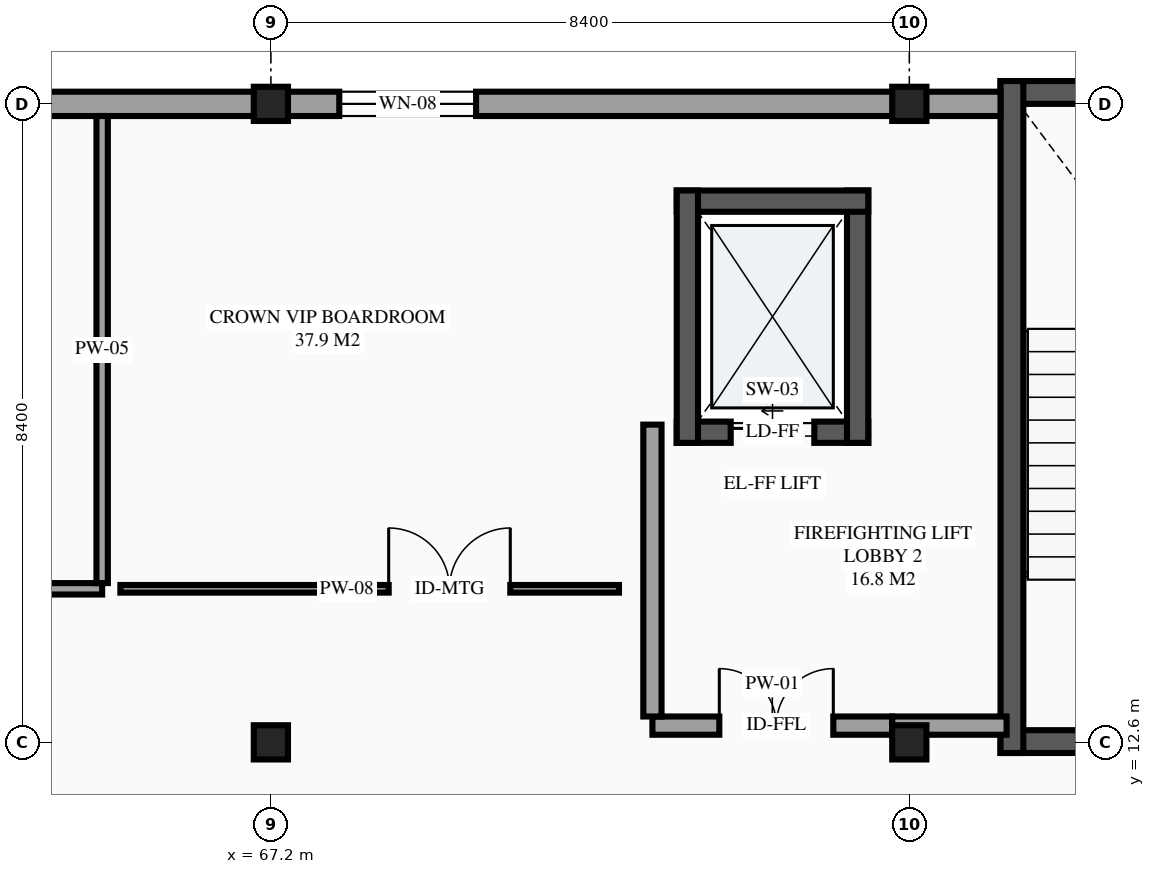
"""IFC4 building model, lengths in metres.
Left out: names, types, materials, properties, quantities, classifications, styles, units other than length and angle.
Written with IfcOpenShell. Run it as: python <this file> out.ifc"""

import sys

from ifc_helpers import new_model, si_unit, direction, frame, frame_2d, origin, origin_2d, place, context, subcontext, project, spatial, rectangle, extrude, element, fill, save


model = new_model("IFC4")
c1 = context("Model", 3, precision=1e-05, world=origin(), true_north=direction((0.0, 1.0)))
c2 = subcontext(c1, "Body", "Model", "MODEL_VIEW")
j1 = project(units=[si_unit("LENGTHUNIT", "METRE"), si_unit("PLANEANGLEUNIT", "RADIAN")], contexts=[c1])
p1 = place(None, origin())
s1 = spatial("IfcSite", under=j1, at=p1, CompositionType="ELEMENT")
p2 = place(p1, origin())
s2 = spatial("IfcBuilding", under=s1, at=p2, CompositionType="ELEMENT")
p3 = place(p2, frame((0.0, 0.0, 43.5)))
s3 = spatial("IfcBuildingStorey", under=s2, at=p3, CompositionType="ELEMENT", Elevation=43.5)
for number, where, z_axis, x_axis in (
    (1, (67.2, 12.6, 0.0), (0.0, 0.0, 1.0), (1.0, 0.0, 0.0)),
    (2, (67.2, 21.0, 0.0), (0.0, 0.0, 1.0), (1.0, 0.0, 0.0)),
    (3, (75.6, 12.6, 0.0), (0.0, 0.0, 1.0), (1.0, 0.0, 0.0)),
    (4, (75.6, 21.0, 0.0), (0.0, 0.0, 1.0), (1.0, 0.0, 0.0)),
):
    element("IfcColumn", number, at=place(p3, frame(where, z_axis=z_axis, x_axis=x_axis)), inside=s3, PredefinedType="COLUMN", context=c2, shape_type="SweptSolid", body=[
        extrude(rectangle(XDim=0.45, YDim=0.45, at=origin_2d()), origin(), (0.0, 0.0, 1.0), 3.6),
    ])
p4 = place(p3, frame((75.6, 21.0, 0.0), z_axis=(0.0, 0.0, 1.0), x_axis=(-1.0, 0.0, 0.0)))
e5 = element("IfcWall", 5, at=p4, inside=s3, PredefinedType="STANDARD", context=c2, shape_type="SweptSolid", body=[
    extrude(rectangle(XDim=16.8, YDim=0.32, at=frame_2d((8.4, 0.0))), origin(), (0.0, 0.0, 1.0), 2.66),
])
p5 = place(p4, frame((5.7, 0.0, 0.75)))
e6 = element("IfcOpeningElement", 6, at=p5, cuts=e5, PredefinedType="OPENING", context=c2, shape_type="SweptSolid", body=[
    extrude(rectangle(XDim=1.8, YDim=1.5, at=frame_2d((0.9, 0.75))), frame((0.0, 0.17, 0.0), z_axis=(0.0, -1.0, 0.0), x_axis=(1.0, 0.0, 0.0)), (0.0, 0.0, 1.0), 0.34),
])
p6 = place(p3, frame((72.54, 16.68, 0.0), z_axis=(0.0, 0.0, 1.0), x_axis=(1.0, 0.0, 0.0)))
e7 = element("IfcWall", 7, at=p6, inside=s3, PredefinedType="SHEAR", context=c2, shape_type="SweptSolid", body=[
    extrude(rectangle(XDim=2.52, YDim=0.28, at=frame_2d((1.26, 0.0))), origin(), (0.0, 0.0, 1.0), 3.6),
])
p7 = place(p6, frame((0.71, 0.0, 0.0)))
e8 = element("IfcOpeningElement", 8, at=p7, cuts=e7, PredefinedType="OPENING", context=c2, shape_type="SweptSolid", body=[
    extrude(rectangle(XDim=1.1, YDim=2.2, at=frame_2d((0.55, 1.1))), frame((0.0, 0.15, 0.0), z_axis=(0.0, -1.0, 0.0), x_axis=(1.0, 0.0, 0.0)), (0.0, 0.0, 1.0), 0.3),
])
p8 = place(p3, frame((74.92, 16.54, 0.0), z_axis=(0.0, 0.0, 1.0), x_axis=(0.0, 1.0, 0.0)))
e9 = element("IfcWall", 9, at=p8, inside=s3, PredefinedType="SHEAR", context=c2, shape_type="SweptSolid", body=[
    extrude(rectangle(XDim=3.32, YDim=0.28, at=frame_2d((1.66, 0.0))), origin(), (0.0, 0.0, 1.0), 3.6),
])
p9 = place(p3, frame((75.06, 19.72, 0.0), z_axis=(0.0, 0.0, 1.0), x_axis=(-1.0, 0.0, 0.0)))
e10 = element("IfcWall", 10, at=p9, inside=s3, PredefinedType="SHEAR", context=c2, shape_type="SweptSolid", body=[
    extrude(rectangle(XDim=2.52, YDim=0.28, at=frame_2d((1.26, 0.0))), origin(), (0.0, 0.0, 1.0), 3.6),
])
p10 = place(p3, frame((72.68, 19.86, 0.0), z_axis=(0.0, 0.0, 1.0), x_axis=(0.0, -1.0, 0.0)))
e11 = element("IfcWall", 11, at=p10, inside=s3, PredefinedType="SHEAR", context=c2, shape_type="SweptSolid", body=[
    extrude(rectangle(XDim=3.32, YDim=0.28, at=frame_2d((1.66, 0.0))), origin(), (0.0, 0.0, 1.0), 3.6),
])
p11 = place(p3, frame((76.8, 12.61, 0.0), z_axis=(0.0, 0.0, 1.0), x_axis=(1.0, 0.0, 0.0)))
e12 = element("IfcWall", 12, at=p11, inside=s3, PredefinedType="SHEAR", context=c2, shape_type="SweptSolid", body=[
    extrude(rectangle(XDim=5.2, YDim=0.3, at=frame_2d((2.6, 0.0))), origin(), (0.0, 0.0, 1.0), 3.6),
])
p12 = place(p11, frame((2.025, 0.0, 0.0)))
e13 = element("IfcOpeningElement", 13, at=p12, cuts=e12, PredefinedType="OPENING", context=c2, shape_type="SweptSolid", body=[
    extrude(rectangle(XDim=1.15, YDim=2.15, at=frame_2d((0.575, 1.075))), frame((0.0, 0.16, 0.0), z_axis=(0.0, -1.0, 0.0), x_axis=(1.0, 0.0, 0.0)), (0.0, 0.0, 1.0), 0.32),
])
p13 = place(p3, frame((82.0, 21.15, 0.0), z_axis=(0.0, 0.0, 1.0), x_axis=(-1.0, 0.0, 0.0)))
e14 = element("IfcWall", 14, at=p13, inside=s3, PredefinedType="SHEAR", context=c2, shape_type="SweptSolid", body=[
    extrude(rectangle(XDim=5.2, YDim=0.3, at=frame_2d((2.6, 0.0))), origin(), (0.0, 0.0, 1.0), 3.6),
])
p14 = place(p3, frame((76.95, 21.3, 0.0), z_axis=(0.0, 0.0, 1.0), x_axis=(0.0, -1.0, 0.0)))
e15 = element("IfcWall", 15, at=p14, inside=s3, PredefinedType="SHEAR", context=c2, shape_type="SweptSolid", body=[
    extrude(rectangle(XDim=8.84, YDim=0.3, at=frame_2d((4.42, 0.0))), origin(), (0.0, 0.0, 1.0), 3.6),
])
p15 = place(p3, frame((72.22, 12.82, 0.0), z_axis=(0.0, 0.0, 1.0), x_axis=(1.0, 0.0, 0.0)))
e16 = element("IfcWall", 16, at=p15, inside=s3, PredefinedType="PARTITIONING", context=c2, shape_type="SweptSolid", body=[
    extrude(rectangle(XDim=3.155, YDim=0.24, at=frame_2d((1.578, 0.0))), origin(), (0.0, 0.0, 1.0), 2.71),
])
p16 = place(p15, frame((0.88, 0.0, 0.0)))
e17 = element("IfcOpeningElement", 17, at=p16, cuts=e16, PredefinedType="OPENING", context=c2, shape_type="SweptSolid", body=[
    extrude(rectangle(XDim=1.5, YDim=2.15, at=frame_2d((0.75, 1.075))), frame((0.0, 0.13, 0.0), z_axis=(0.0, -1.0, 0.0), x_axis=(1.0, 0.0, 0.0)), (0.0, 0.0, 1.0), 0.26),
])
p17 = place(p3, frame((72.22, 12.94, 0.0), z_axis=(0.0, 0.0, 1.0), x_axis=(0.0, 1.0, 0.0)))
e18 = element("IfcWall", 18, at=p17, inside=s3, PredefinedType="PARTITIONING", context=c2, shape_type="SweptSolid", body=[
    extrude(rectangle(XDim=3.84, YDim=0.24, at=frame_2d((1.92, 0.0))), origin(), (0.0, 0.0, 1.0), 3.355),
])
p18 = place(p3, frame((51.22, 14.62, 0.0), z_axis=(0.0, 0.0, 1.0), x_axis=(1.0, 0.0, 0.0)))
e19 = element("IfcWall", 19, at=p18, inside=s3, PredefinedType="PARTITIONING", context=c2, shape_type="SweptSolid", body=[
    extrude(rectangle(XDim=13.76, YDim=0.15, at=frame_2d((6.88, 0.0))), origin(), (0.0, 0.0, 1.0), 3.355),
])
p19 = place(p18, frame((4.68, 0.0, 0.0)))
e20 = element("IfcOpeningElement", 20, at=p19, cuts=e19, PredefinedType="OPENING", context=c2, shape_type="SweptSolid", body=[
    extrude(rectangle(XDim=1.6, YDim=2.25, at=frame_2d((0.8, 1.125))), frame((0.0, 0.085, 0.0), z_axis=(0.0, -1.0, 0.0), x_axis=(1.0, 0.0, 0.0)), (0.0, 0.0, 1.0), 0.17),
])
p20 = place(p3, frame((64.98, 14.695, 0.0), z_axis=(0.0, 0.0, 1.0), x_axis=(0.0, 1.0, 0.0)))
e21 = element("IfcWall", 21, at=p20, inside=s3, PredefinedType="PARTITIONING", context=c2, shape_type="SweptSolid", body=[
    extrude(rectangle(XDim=6.145, YDim=0.15, at=frame_2d((3.073, 0.0))), origin(), (0.0, 0.0, 1.0), 3.355),
])
p21 = place(p3, frame((65.22, 14.62, 0.0), z_axis=(0.0, 0.0, 1.0), x_axis=(1.0, 0.0, 0.0)))
e22 = element("IfcWall", 22, at=p21, inside=s3, PredefinedType="PARTITIONING", context=c2, shape_type="SweptSolid", body=[
    extrude(rectangle(XDim=6.56, YDim=0.1, at=frame_2d((3.28, 0.0))), origin(), (0.0, 0.0, 1.0), 3.355),
])
p22 = place(p21, frame((3.53, 0.0, 0.0)))
e23 = element("IfcOpeningElement", 23, at=p22, cuts=e22, PredefinedType="OPENING", context=c2, shape_type="SweptSolid", body=[
    extrude(rectangle(XDim=1.6, YDim=2.25, at=frame_2d((0.8, 1.125))), frame((0.0, 0.06, 0.0), z_axis=(0.0, -1.0, 0.0), x_axis=(1.0, 0.0, 0.0)), (0.0, 0.0, 1.0), 0.12),
])
p23 = place(p3, frame((76.8, 21.0, 0.0), z_axis=(0.0, 0.0, 1.0), x_axis=(-1.0, 0.0, 0.0)))
e24 = element("IfcWall", 24, at=p23, inside=s3, PredefinedType="STANDARD", context=c2, shape_type="SweptSolid", body=[
    extrude(rectangle(XDim=1.2, YDim=0.32, at=frame_2d((0.6, 0.0))), origin(), (0.0, 0.0, 1.0), 3.106),
])
p24 = place(p3, frame((75.375, 12.82, 0.0), z_axis=(0.0, 0.0, 1.0), x_axis=(1.0, 0.0, 0.0)))
e25 = element("IfcWall", 25, at=p24, inside=s3, PredefinedType="PARTITIONING", context=c2, shape_type="SweptSolid", body=[
    extrude(rectangle(XDim=1.505, YDim=0.24, at=frame_2d((0.752, 0.0))), origin(), (0.0, 0.0, 1.0), 3.355),
])
p25 = place(p5, origin())
e26 = element("IfcWindow", 26, at=p25, inside=s3, PartitioningType="SINGLE_PANEL", PredefinedType="WINDOW", context=c2, shape_type="SweptSolid", body=[
    extrude(rectangle(XDim=1.8, YDim=1.5, at=frame_2d((0.9, 0.75))), frame((0.0, 0.03, 0.0), z_axis=(0.0, -1.0, 0.0), x_axis=(1.0, 0.0, 0.0)), (0.0, 0.0, 1.0), 0.06),
])
fill(e6, e26)
p26 = place(p7, origin())
e27 = element("IfcDoor", 27, at=p26, inside=s3, OperationType="SLIDING_TO_LEFT", PredefinedType="DOOR", context=c2, shape_type="SweptSolid", body=[
    extrude(rectangle(XDim=1.1, YDim=2.2, at=frame_2d((0.55, 1.1))), frame((0.0, 0.025, 0.0), z_axis=(0.0, -1.0, 0.0), x_axis=(1.0, 0.0, 0.0)), (0.0, 0.0, 1.0), 0.05),
])
fill(e8, e27)
p27 = place(p16, origin())
e28 = element("IfcDoor", 28, at=p27, inside=s3, OperationType="DOUBLE_DOOR_SINGLE_SWING", PredefinedType="DOOR", context=c2, shape_type="SweptSolid", body=[
    extrude(rectangle(XDim=1.5, YDim=2.15, at=frame_2d((0.75, 1.075))), frame((0.0, 0.025, 0.0), z_axis=(0.0, -1.0, 0.0), x_axis=(1.0, 0.0, 0.0)), (0.0, 0.0, 1.0), 0.05),
])
fill(e17, e28)
p28 = place(p22, origin())
e29 = element("IfcDoor", 29, at=p28, inside=s3, OperationType="DOUBLE_DOOR_SINGLE_SWING", PredefinedType="DOOR", context=c2, shape_type="SweptSolid", body=[
    extrude(rectangle(XDim=1.6, YDim=2.25, at=frame_2d((0.8, 1.125))), frame((0.0, 0.025, 0.0), z_axis=(0.0, -1.0, 0.0), x_axis=(1.0, 0.0, 0.0)), (0.0, 0.0, 1.0), 0.05),
])
fill(e23, e29)
save(model, sys.argv[1])
